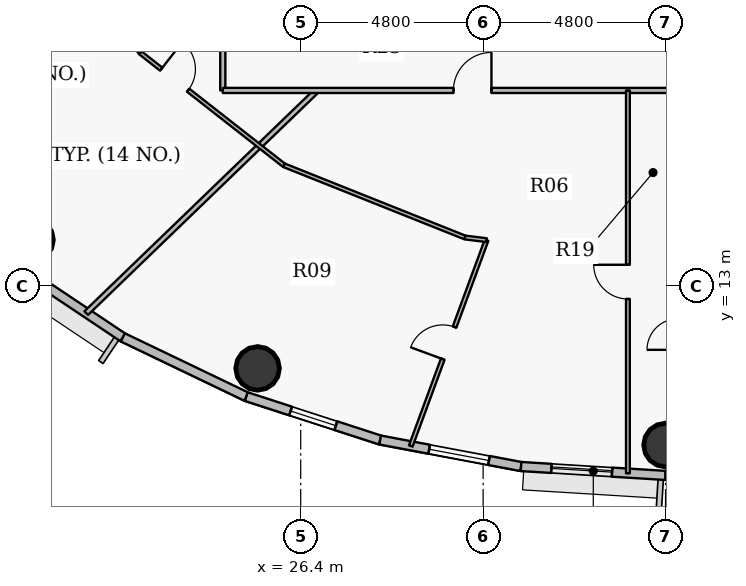
"""IFC4 building model, lengths in metres.
Left out: names, types, materials, properties, quantities, classifications, styles, units other than length and angle.
Written with IfcOpenShell. Run it as: python <this file> out.ifc"""

import sys

from ifc_helpers import new_model, si_unit, direction, frame, frame_2d, origin, origin_2d, place, context, subcontext, project, spatial, rectangle, hollow_circle, extrude, source, transform, mapped, element, fill, save


model = new_model("IFC4")
c1 = context("Model", 3, precision=1e-05, world=origin(), true_north=direction((0.0, 1.0)))
c2 = subcontext(c1, "Body", "Model", "MODEL_VIEW")
j1 = project(units=[si_unit("LENGTHUNIT", "METRE"), si_unit("PLANEANGLEUNIT", "RADIAN")], contexts=[c1])
p1 = place(None, origin())
s1 = spatial("IfcSite", under=j1, at=p1, CompositionType="ELEMENT")
p2 = place(p1, origin())
s2 = spatial("IfcBuilding", under=s1, at=p2, CompositionType="ELEMENT")
p3 = place(p2, frame((0.0, 0.0, 259.05)))
s3 = spatial("IfcBuildingStorey", under=s2, at=p3, CompositionType="ELEMENT", Elevation=259.05)
for number, where, z_axis, x_axis in (
    (1, (19.317, 14.219, 0.0), (0.0, 0.0, 1.0), (1.0, 0.0, 0.0)),
    (2, (25.265, 10.836, 0.0), (0.0, 0.0, 1.0), (1.0, 0.0, 0.0)),
    (3, (36.0, 8.82, 0.0), (0.0, 0.0, 1.0), (1.0, 0.0, 0.0)),
):
    element("IfcColumn", number, at=place(p3, frame(where, z_axis=z_axis, x_axis=x_axis)), inside=s3, PredefinedType="COLUMN", context=c2, shape_type="SweptSolid", body=[
        extrude(hollow_circle(Radius=0.575, WallThickness=0.036, at=origin_2d()), origin(), (0.0, 0.0, 1.0), 3.75),
    ])
p4 = place(p3, frame((21.72, 11.652, 0.0), z_axis=(0.0, 0.0, 1.0), x_axis=(-0.831262496074, 0.555880079352, 0.0)))
e4 = element("IfcWall", 4, at=p4, inside=s3, PredefinedType="SOLIDWALL", context=c2, shape_type="SweptSolid", body=[
    extrude(rectangle(XDim=3.484, YDim=0.24, at=frame_2d((1.742, 0.0))), origin(), (0.0, 0.0, 1.0), 3.45),
])
p5 = place(p3, frame((24.969, 10.094, 0.0), z_axis=(0.0, 0.0, 1.0), x_axis=(-0.901598104751, 0.432574684313, 0.0)))
e5 = element("IfcWall", 5, at=p5, inside=s3, PredefinedType="SOLIDWALL", context=c2, shape_type="SweptSolid", body=[
    extrude(rectangle(XDim=3.604, YDim=0.24, at=frame_2d((1.802, 0.0))), origin(), (0.0, 0.0, 1.0), 3.45),
])
p6 = place(p3, frame((28.491, 8.951, 0.0), z_axis=(0.0, 0.0, 1.0), x_axis=(-0.951210789182, 0.308541787354, 0.0)))
e6 = element("IfcWall", 6, at=p6, inside=s3, PredefinedType="SOLIDWALL", context=c2, shape_type="SweptSolid", body=[
    extrude(rectangle(XDim=3.702, YDim=0.24, at=frame_2d((1.851, 0.0))), origin(), (0.0, 0.0, 1.0), 3.45),
])
p7 = place(p6, frame((1.226, 0.0, 0.9)))
e7 = element("IfcOpeningElement", 7, at=p7, cuts=e6, PredefinedType="OPENING", context=c2, shape_type="SweptSolid", body=[
    extrude(rectangle(XDim=1.25, YDim=1.65, at=origin_2d()), frame((0.625, 0.13, 0.825), z_axis=(0.0, -1.0, 0.0), x_axis=(1.0, 0.0, 0.0)), (0.0, 0.0, 1.0), 0.26),
])
p8 = place(p3, frame((32.198, 8.254, 0.0), z_axis=(0.0, 0.0, 1.0), x_axis=(-0.982784898575, 0.184753465822, 0.0)))
e8 = element("IfcWall", 8, at=p8, inside=s3, PredefinedType="SOLIDWALL", context=c2, shape_type="SweptSolid", body=[
    extrude(rectangle(XDim=3.773, YDim=0.24, at=frame_2d((1.886, 0.0))), origin(), (0.0, 0.0, 1.0), 3.45),
])
p9 = place(p8, frame((0.859, 0.0, 0.9)))
e9 = element("IfcOpeningElement", 9, at=p9, cuts=e8, PredefinedType="OPENING", context=c2, shape_type="SweptSolid", body=[
    extrude(rectangle(XDim=1.6, YDim=1.75, at=origin_2d()), frame((0.8, 0.13, 0.875), z_axis=(0.0, -1.0, 0.0), x_axis=(1.0, 0.0, 0.0)), (0.0, 0.0, 1.0), 0.26),
])
p10 = place(p3, frame((36.0, 8.02, 0.0), z_axis=(0.0, 0.0, 1.0), x_axis=(-0.998108785312, 0.06147237333, 0.0)))
e10 = element("IfcWall", 10, at=p10, inside=s3, PredefinedType="SOLIDWALL", context=c2, shape_type="SweptSolid", body=[
    extrude(rectangle(XDim=3.809, YDim=0.24, at=frame_2d((1.904, 0.0))), origin(), (0.0, 0.0, 1.0), 3.45),
])
p11 = place(p10, frame((1.41, 0.0, 0.9)))
e11 = element("IfcOpeningElement", 11, at=p11, cuts=e10, PredefinedType="OPENING", context=c2, shape_type="SweptSolid", body=[
    extrude(rectangle(XDim=1.6, YDim=1.75, at=origin_2d()), frame((0.8, 0.13, 0.875), z_axis=(0.0, -1.0, 0.0), x_axis=(1.0, 0.0, 0.0)), (0.0, 0.0, 1.0), 0.26),
])
p12 = place(p3, frame((39.802, 8.254, 0.0), z_axis=(0.0, 0.0, 1.0), x_axis=(-0.998108785312, -0.06147237333, 0.0)))
e12 = element("IfcWall", 12, at=p12, inside=s3, PredefinedType="SOLIDWALL", context=c2, shape_type="SweptSolid", body=[
    extrude(rectangle(XDim=3.809, YDim=0.24, at=frame_2d((1.904, 0.0))), origin(), (0.0, 0.0, 1.0), 3.45),
])
p13 = place(p3, frame((20.756, 12.291, 0.0), z_axis=(0.0, 0.0, 1.0), x_axis=(0.719623273788, 0.694364705196, 0.0)))
e13 = element("IfcWall", 13, at=p13, inside=s3, PredefinedType="PARTITIONING", context=c2, shape_type="SweptSolid", body=[
    extrude(rectangle(XDim=8.438, YDim=0.135, at=frame_2d((4.219, 0.0))), origin(), (0.0, 0.0, 1.0), 2.935),
])
p14 = place(p3, frame((21.856, 19.641, 0.0), z_axis=(0.0, 0.0, 1.0), x_axis=(0.545246536912, -0.838275738636, 0.0)))
e14 = element("IfcWall", 14, at=p14, inside=s3, PredefinedType="PARTITIONING", context=c2, shape_type="SweptSolid", body=[
    extrude(rectangle(XDim=0.598, YDim=0.1, at=frame_2d((0.299, 0.0))), origin(), (0.0, 0.0, 1.0), 3.45),
])
p15 = place(p3, frame((22.182, 19.139, 0.0), z_axis=(0.0, 0.0, 1.0), x_axis=(0.787386902975, -0.616459134917, 0.0)))
e15 = element("IfcWall", 15, at=p15, inside=s3, PredefinedType="PARTITIONING", context=c2, shape_type="SweptSolid", body=[
    extrude(rectangle(XDim=4.799, YDim=0.1, at=frame_2d((2.399, 0.0))), origin(), (0.0, 0.0, 1.0), 2.885),
])
p16 = place(p15, frame((0.695, 0.0, 0.0)))
e16 = element("IfcOpeningElement", 16, at=p16, cuts=e15, PredefinedType="OPENING", context=c2, shape_type="SweptSolid", body=[
    extrude(rectangle(XDim=0.9, YDim=2.1, at=origin_2d()), frame((0.45, 0.06, 1.05), z_axis=(0.0, -1.0, 0.0), x_axis=(1.0, 0.0, 0.0)), (0.0, 0.0, 1.0), 0.12),
])
p17 = place(p3, frame((24.35, 18.15, 0.0), z_axis=(0.0, 0.0, 1.0), x_axis=(0.0, 1.0, 0.0)))
e17 = element("IfcWall", 17, at=p17, inside=s3, PredefinedType="PARTITIONING", context=c2, shape_type="SweptSolid", body=[
    extrude(rectangle(XDim=6.585, YDim=0.135, at=frame_2d((3.293, 0.0))), origin(), (0.0, 0.0, 1.0), 2.885),
])
p18 = place(p3, frame((24.35, 18.15, 0.0), z_axis=(0.0, 0.0, 1.0), x_axis=(1.0, 0.0, 0.0)))
e18 = element("IfcWall", 18, at=p18, inside=s3, PredefinedType="PARTITIONING", context=c2, shape_type="SweptSolid", body=[
    extrude(rectangle(XDim=23.85, YDim=0.135, at=frame_2d((11.925, 0.0))), origin(), (0.0, 0.0, 1.0), 2.885),
])
p19 = place(p18, frame((6.069, 0.0, 0.0)))
e19 = element("IfcOpeningElement", 19, at=p19, cuts=e18, PredefinedType="OPENING", context=c2, shape_type="SweptSolid", body=[
    extrude(rectangle(XDim=1.0, YDim=2.15, at=origin_2d()), frame((0.5, 0.078, 1.075), z_axis=(0.0, -1.0, 0.0), x_axis=(1.0, 0.0, 0.0)), (0.0, 0.0, 1.0), 0.155),
])
p20 = place(p18, frame((19.505, 0.0, 0.0)))
e20 = element("IfcOpeningElement", 20, at=p20, cuts=e18, PredefinedType="OPENING", context=c2, shape_type="SweptSolid", body=[
    extrude(rectangle(XDim=1.0, YDim=2.15, at=origin_2d()), frame((0.5, 0.078, 1.075), z_axis=(0.0, -1.0, 0.0), x_axis=(1.0, 0.0, 0.0)), (0.0, 0.0, 1.0), 0.155),
])
p21 = place(p3, frame((25.961, 16.181, 0.0), z_axis=(0.0, 0.0, 1.0), x_axis=(0.928801505367, -0.370577608105, 0.0)))
e21 = element("IfcWall", 21, at=p21, inside=s3, PredefinedType="PARTITIONING", context=c2, shape_type="SweptSolid", body=[
    extrude(rectangle(XDim=5.126, YDim=0.1, at=frame_2d((2.563, 0.0))), origin(), (0.0, 0.0, 1.0), 2.885),
])
p22 = place(p3, frame((29.296, 8.795, 0.0), z_axis=(0.0, 0.0, 1.0), x_axis=(0.345568130342, 0.938393663284, 0.0)))
e22 = element("IfcWall", 22, at=p22, inside=s3, PredefinedType="PARTITIONING", context=c2, shape_type="SweptSolid", body=[
    extrude(rectangle(XDim=5.771, YDim=0.1, at=frame_2d((2.886, 0.0))), origin(), (0.0, 0.0, 1.0), 2.935),
])
p23 = place(p22, frame((2.436, 0.0, 0.0)))
e23 = element("IfcOpeningElement", 23, at=p23, cuts=e22, PredefinedType="OPENING", context=c2, shape_type="SweptSolid", body=[
    extrude(rectangle(XDim=0.9, YDim=2.1, at=origin_2d()), frame((0.45, 0.06, 1.05), z_axis=(0.0, -1.0, 0.0), x_axis=(1.0, 0.0, 0.0)), (0.0, 0.0, 1.0), 0.12),
])
p24 = place(p3, frame((30.722, 14.281, 0.0), z_axis=(0.0, 0.0, 1.0), x_axis=(0.992395375367, -0.123091100206, 0.0)))
e24 = element("IfcWall", 24, at=p24, inside=s3, PredefinedType="PARTITIONING", context=c2, shape_type="SweptSolid", body=[
    extrude(rectangle(XDim=0.573, YDim=0.1, at=frame_2d((0.287, 0.0))), origin(), (0.0, 0.0, 1.0), 3.45),
])
p25 = place(p3, frame((35.01, 8.076, 0.0), z_axis=(0.0, 0.0, 1.0), x_axis=(0.0, 1.0, 0.0)))
e25 = element("IfcWall", 25, at=p25, inside=s3, PredefinedType="PARTITIONING", context=c2, shape_type="SweptSolid", body=[
    extrude(rectangle(XDim=10.074, YDim=0.1, at=frame_2d((5.037, 0.0))), origin(), (0.0, 0.0, 1.0), 2.935),
])
p26 = place(p25, frame((4.587, 0.0, 0.0)))
e26 = element("IfcOpeningElement", 26, at=p26, cuts=e25, PredefinedType="OPENING", context=c2, shape_type="SweptSolid", body=[
    extrude(rectangle(XDim=0.9, YDim=2.1, at=origin_2d()), frame((0.45, 0.06, 1.05), z_axis=(0.0, -1.0, 0.0), x_axis=(1.0, 0.0, 0.0)), (0.0, 0.0, 1.0), 0.12),
])
m1 = source(origin(), c2, "Body", "SweptSolid", [
    extrude(rectangle(XDim=1.6, YDim=1.75, at=origin_2d()), frame((0.8, 0.03, 0.875), z_axis=(0.0, -1.0, 0.0), x_axis=(1.0, 0.0, 0.0)), (0.0, 0.0, 1.0), 0.06),
])
p27 = place(p9, origin())
e27 = element("IfcWindow", 27, at=p27, inside=s3, PartitioningType="DOUBLE_PANEL_VERTICAL", PredefinedType="WINDOW", context=c2, shape_type="MappedRepresentation", body=[
    mapped(m1, transform((0.0, 0.0, 0.0), x_axis=(1.0, 0.0, 0.0), y_axis=(0.0, 1.0, 0.0), z_axis=(0.0, 0.0, 1.0), scale=1.0)),
])
fill(e9, e27)
p28 = place(p11, origin())
e28 = element("IfcWindow", 28, at=p28, inside=s3, PartitioningType="DOUBLE_PANEL_VERTICAL", PredefinedType="WINDOW", context=c2, shape_type="MappedRepresentation", body=[
    mapped(m1, transform((0.0, 0.0, 0.0), x_axis=(1.0, 0.0, 0.0), y_axis=(0.0, 1.0, 0.0), z_axis=(0.0, 0.0, 1.0), scale=1.0)),
])
fill(e11, e28)
m2 = source(origin(), c2, "Body", "SweptSolid", [
    extrude(rectangle(XDim=1.25, YDim=1.65, at=origin_2d()), frame((0.625, 0.03, 0.825), z_axis=(0.0, -1.0, 0.0), x_axis=(1.0, 0.0, 0.0)), (0.0, 0.0, 1.0), 0.06),
])
p29 = place(p7, origin())
e29 = element("IfcWindow", 29, at=p29, inside=s3, PartitioningType="SINGLE_PANEL", PredefinedType="WINDOW", context=c2, shape_type="MappedRepresentation", body=[
    mapped(m2, transform((0.0, 0.0, 0.0), x_axis=(1.0, 0.0, 0.0), y_axis=(0.0, 1.0, 0.0), z_axis=(0.0, 0.0, 1.0), scale=1.0)),
])
fill(e7, e29)
m3 = source(origin(), c2, "Body", "SweptSolid", [
    extrude(rectangle(XDim=0.9, YDim=2.1, at=origin_2d()), frame((0.45, 0.025, 1.05), z_axis=(0.0, -1.0, 0.0), x_axis=(1.0, 0.0, 0.0)), (0.0, 0.0, 1.0), 0.05),
])
p30 = place(p16, origin())
e30 = element("IfcDoor", 30, at=p30, inside=s3, OperationType="SINGLE_SWING_LEFT", PredefinedType="DOOR", context=c2, shape_type="MappedRepresentation", body=[
    mapped(m3, transform((0.0, 0.0, 0.0), x_axis=(1.0, 0.0, 0.0), y_axis=(0.0, 1.0, 0.0), z_axis=(0.0, 0.0, 1.0), scale=1.0)),
])
fill(e16, e30)
m4 = source(origin(), c2, "Body", "SweptSolid", [
    extrude(rectangle(XDim=1.0, YDim=2.15, at=origin_2d()), frame((0.5, 0.025, 1.075), z_axis=(0.0, -1.0, 0.0), x_axis=(1.0, 0.0, 0.0)), (0.0, 0.0, 1.0), 0.05),
])
p31 = place(p19, origin())
e31 = element("IfcDoor", 31, at=p31, inside=s3, OperationType="SINGLE_SWING_RIGHT", PredefinedType="DOOR", context=c2, shape_type="MappedRepresentation", body=[
    mapped(m4, transform((0.0, 0.0, 0.0), x_axis=(1.0, 0.0, 0.0), y_axis=(0.0, 1.0, 0.0), z_axis=(0.0, 0.0, 1.0), scale=1.0)),
])
fill(e19, e31)
p32 = place(p23, origin())
e32 = element("IfcDoor", 32, at=p32, inside=s3, OperationType="SINGLE_SWING_LEFT", PredefinedType="DOOR", context=c2, shape_type="MappedRepresentation", body=[
    mapped(m3, transform((0.0, 0.0, 0.0), x_axis=(1.0, 0.0, 0.0), y_axis=(0.0, 1.0, 0.0), z_axis=(0.0, 0.0, 1.0), scale=1.0)),
])
fill(e23, e32)
p33 = place(p26, origin())
e33 = element("IfcDoor", 33, at=p33, inside=s3, OperationType="SINGLE_SWING_RIGHT", PredefinedType="DOOR", context=c2, shape_type="MappedRepresentation", body=[
    mapped(m3, transform((0.0, 0.0, 0.0), x_axis=(1.0, 0.0, 0.0), y_axis=(0.0, 1.0, 0.0), z_axis=(0.0, 0.0, 1.0), scale=1.0)),
])
fill(e26, e33)
save(model, sys.argv[1])
